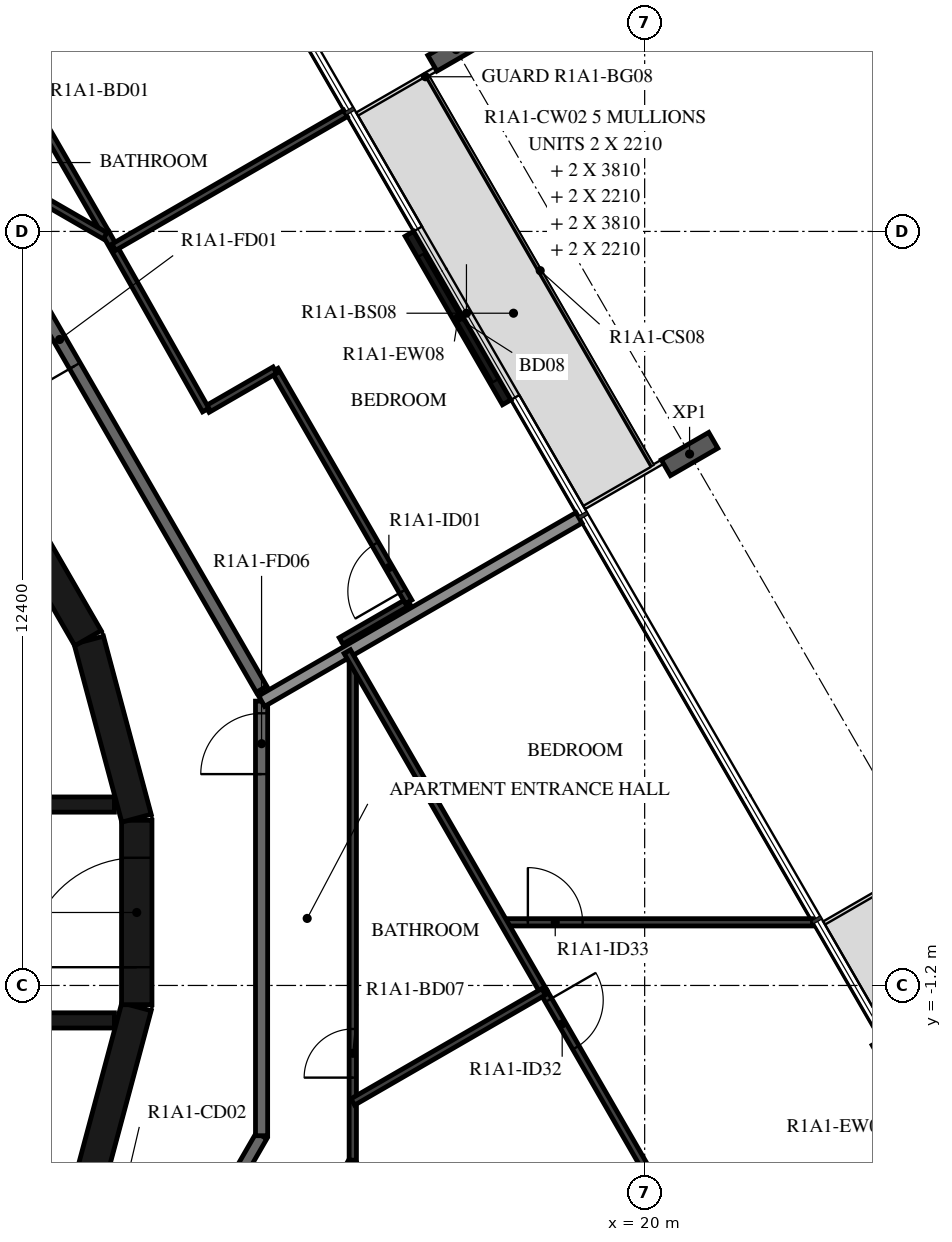
"""IFC4 building model, lengths in metres.
Left out: names, types, materials, properties, quantities, classifications, styles, units other than length and angle.
Written with IfcOpenShell. Run it as: python <this file> out.ifc"""

import sys

from ifc_helpers import new_model, si_unit, direction, frame, frame_2d, origin, origin_2d, place, context, subcontext, project, spatial, rectangle, i_section, extrude, element, fill, save


model = new_model("IFC4")
c1 = context("Model", 3, precision=1e-05, world=origin(), true_north=direction((0.0, 1.0)))
c2 = subcontext(c1, "Body", "Model", "MODEL_VIEW")
j1 = project(units=[si_unit("LENGTHUNIT", "METRE"), si_unit("PLANEANGLEUNIT", "RADIAN")], contexts=[c1])
p1 = place(None, origin())
s1 = spatial("IfcSite", under=j1, at=p1, CompositionType="ELEMENT")
p2 = place(p1, origin())
s2 = spatial("IfcBuilding", under=s1, at=p2, CompositionType="ELEMENT")
p3 = place(p2, frame((0.0, 0.0, 41.9)))
s3 = spatial("IfcBuildingStorey", under=s2, at=p3, CompositionType="ELEMENT", Elevation=41.9)
for number, where, z_axis, x_axis in (
    (1, (20.739, 7.539, -0.38), (0.0, 0.0, 1.0), (0.5, -0.866, 0.0)),
    (2, (16.899, 14.19, -0.38), (0.0, 0.0, 1.0), (0.5, -0.866, 0.0)),
):
    element("IfcColumn", number, at=place(p3, frame(where, z_axis=z_axis, x_axis=x_axis)), inside=s3, PredefinedType="COLUMN", context=c2, shape_type="SweptSolid", body=[
        extrude(i_section(OverallWidth=0.3, OverallDepth=0.9, WebThickness=0.019, FlangeThickness=0.035, FilletRadius=0.03, at=origin_2d()), origin(), (0.0, 0.0, 1.0), 3.5),
    ])
p4 = place(p3, frame((25.411, -4.913, 0.0), z_axis=(0.0, 0.0, 1.0), x_axis=(-0.500028443584, 0.866008981251, 0.0)))
e3 = element("IfcWall", 3, at=p4, inside=s3, PredefinedType="STANDARD", context=c2, shape_type="SweptSolid", body=[
    extrude(rectangle(XDim=3.2, YDim=0.16, at=frame_2d((1.6, 0.0))), origin(), (0.0, 0.0, 1.0), 3.12),
])
p5 = place(p4, frame((0.4, 0.0, 0.0)))
e4 = element("IfcOpeningElement", 4, at=p5, cuts=e3, PredefinedType="OPENING", context=c2, shape_type="SweptSolid", body=[
    extrude(rectangle(XDim=2.4, YDim=2.4, at=frame_2d((1.2, 1.2))), frame((0.0, 0.09, 0.0), z_axis=(0.0, -1.0, 0.0), x_axis=(1.0, 0.0, 0.0)), (0.0, 0.0, 1.0), 0.18),
])
p6 = place(p3, frame((17.731, 8.389, 0.0), z_axis=(0.0, 0.0, 1.0), x_axis=(-0.500028443584, 0.866008981251, 0.0)))
e5 = element("IfcWall", 5, at=p6, inside=s3, PredefinedType="STANDARD", context=c2, shape_type="SweptSolid", body=[
    extrude(rectangle(XDim=3.2, YDim=0.16, at=frame_2d((1.6, 0.0))), origin(), (0.0, 0.0, 1.0), 3.12),
])
p7 = place(p6, frame((0.4, 0.0, 0.0)))
e6 = element("IfcOpeningElement", 6, at=p7, cuts=e5, PredefinedType="OPENING", context=c2, shape_type="SweptSolid", body=[
    extrude(rectangle(XDim=2.4, YDim=2.4, at=frame_2d((1.2, 1.2))), frame((0.0, 0.09, 0.0), z_axis=(0.0, -1.0, 0.0), x_axis=(1.0, 0.0, 0.0)), (0.0, 0.0, 1.0), 0.18),
])
p8 = place(p3, frame((10.858, -4.479, 0.0), z_axis=(0.0, 0.0, 1.0), x_axis=(0.258734743916, 0.965948410781, 0.0)))
e7 = element("IfcWall", 7, at=p8, inside=s3, PredefinedType="SHEAR", context=c2, shape_type="SweptSolid", body=[
    extrude(rectangle(XDim=3.033, YDim=0.5, at=frame_2d((1.516, 0.0))), origin(), (0.0, 0.0, 1.0), 3.12),
])
p9 = place(p3, frame((11.647, -1.516, 0.0), z_axis=(0.0, 0.0, 1.0), x_axis=(0.0, 1.0, 0.0)))
e8 = element("IfcWall", 8, at=p9, inside=s3, PredefinedType="SHEAR", context=c2, shape_type="SweptSolid", body=[
    extrude(rectangle(XDim=3.033, YDim=0.5, at=frame_2d((1.516, 0.0))), origin(), (0.0, 0.0, 1.0), 3.12),
])
p10 = place(p9, frame((0.616, 0.0, 0.0)))
e9 = element("IfcOpeningElement", 9, at=p10, cuts=e8, PredefinedType="OPENING", context=c2, shape_type="SweptSolid", body=[
    extrude(rectangle(XDim=1.8, YDim=2.1, at=frame_2d((0.9, 1.05))), frame((0.0, 0.26, 0.0), z_axis=(0.0, -1.0, 0.0), x_axis=(1.0, 0.0, 0.0)), (0.0, 0.0, 1.0), 0.52),
])
for number, where, z_axis, x_axis in (
    (10, (11.643, 1.55, 0.0), (0.0, 0.0, 1.0), (-0.259, 0.966, 0.0)),
    (11, (10.845, 4.51, 0.0), (0.0, 0.0, 1.0), (-0.5, 0.866, 0.0)),
):
    element("IfcWall", number, at=place(p3, frame(where, z_axis=z_axis, x_axis=x_axis)), inside=s3, PredefinedType="SHEAR", context=c2, shape_type="SweptSolid", body=[
        extrude(rectangle(XDim=3.033, YDim=0.5, at=frame_2d((1.516, 0.0))), origin(), (0.0, 0.0, 1.0), 3.12),
    ])
p11 = place(p3, frame((3.35, 1.775, 0.0), z_axis=(0.0, 0.0, 1.0), x_axis=(1.0, 0.0, 0.0)))
e12 = element("IfcWall", 12, at=p11, inside=s3, PredefinedType="SHEAR", context=c2, shape_type="SweptSolid", body=[
    extrude(rectangle(XDim=7.93, YDim=0.25, at=frame_2d((3.965, 0.0))), origin(), (0.0, 0.0, 1.0), 3.12),
])
p12 = place(p11, frame((0.35, 0.0, 0.0)))
e13 = element("IfcOpeningElement", 13, at=p12, cuts=e12, PredefinedType="OPENING", context=c2, shape_type="SweptSolid", body=[
    extrude(rectangle(XDim=1.2, YDim=2.4, at=frame_2d((0.6, 1.2))), frame((0.0, 0.135, 0.0), z_axis=(0.0, -1.0, 0.0), x_axis=(1.0, 0.0, 0.0)), (0.0, 0.0, 1.0), 0.27),
])
p13 = place(p11, frame((2.5, 0.0, 0.0)))
e14 = element("IfcOpeningElement", 14, at=p13, cuts=e12, PredefinedType="OPENING", context=c2, shape_type="SweptSolid", body=[
    extrude(rectangle(XDim=1.2, YDim=2.4, at=frame_2d((0.6, 1.2))), frame((0.0, 0.135, 0.0), z_axis=(0.0, -1.0, 0.0), x_axis=(1.0, 0.0, 0.0)), (0.0, 0.0, 1.0), 0.27),
])
p14 = place(p11, frame((4.8, 0.0, 0.0)))
e15 = element("IfcOpeningElement", 15, at=p14, cuts=e12, PredefinedType="OPENING", context=c2, shape_type="SweptSolid", body=[
    extrude(rectangle(XDim=0.9, YDim=2.1, at=frame_2d((0.45, 1.05))), frame((0.0, 0.135, 0.0), z_axis=(0.0, -1.0, 0.0), x_axis=(1.0, 0.0, 0.0)), (0.0, 0.0, 1.0), 0.27),
])
p15 = place(p3, frame((3.35, -1.775, 0.0), z_axis=(0.0, 0.0, 1.0), x_axis=(1.0, 0.0, 0.0)))
e16 = element("IfcWall", 16, at=p15, inside=s3, PredefinedType="SHEAR", context=c2, shape_type="SweptSolid", body=[
    extrude(rectangle(XDim=7.93, YDim=0.25, at=frame_2d((3.965, 0.0))), origin(), (0.0, 0.0, 1.0), 3.12),
])
p16 = place(p15, frame((0.4, 0.0, 0.0)))
e17 = element("IfcOpeningElement", 17, at=p16, cuts=e16, PredefinedType="OPENING", context=c2, shape_type="SweptSolid", body=[
    extrude(rectangle(XDim=1.1, YDim=2.4, at=frame_2d((0.55, 1.2))), frame((0.0, 0.135, 0.0), z_axis=(0.0, -1.0, 0.0), x_axis=(1.0, 0.0, 0.0)), (0.0, 0.0, 1.0), 0.27),
])
p17 = place(p15, frame((2.55, 0.0, 0.0)))
e18 = element("IfcOpeningElement", 18, at=p17, cuts=e16, PredefinedType="OPENING", context=c2, shape_type="SweptSolid", body=[
    extrude(rectangle(XDim=1.1, YDim=2.4, at=frame_2d((0.55, 1.2))), frame((0.0, 0.135, 0.0), z_axis=(0.0, -1.0, 0.0), x_axis=(1.0, 0.0, 0.0)), (0.0, 0.0, 1.0), 0.27),
])
p18 = place(p15, frame((4.7, 0.0, 0.0)))
e19 = element("IfcOpeningElement", 19, at=p18, cuts=e16, PredefinedType="OPENING", context=c2, shape_type="SweptSolid", body=[
    extrude(rectangle(XDim=1.1, YDim=2.4, at=frame_2d((0.55, 1.2))), frame((0.0, 0.135, 0.0), z_axis=(0.0, -1.0, 0.0), x_axis=(1.0, 0.0, 0.0)), (0.0, 0.0, 1.0), 0.27),
])
p19 = place(p3, frame((13.7, 3.671, 0.0), z_axis=(0.0, 0.0, 1.0), x_axis=(-0.500001669485, 0.866024439905, 0.0)))
e20 = element("IfcWall", 20, at=p19, inside=s3, PredefinedType="STANDARD", context=c2, shape_type="SweptSolid", body=[
    extrude(rectangle(XDim=7.342, YDim=0.2, at=frame_2d((3.671, 0.0))), origin(), (0.0, 0.0, 1.0), 3.12),
])
p20 = place(p19, frame((6.142, 0.0, 0.0)))
e21 = element("IfcOpeningElement", 21, at=p20, cuts=e20, PredefinedType="OPENING", context=c2, shape_type="SweptSolid", body=[
    extrude(rectangle(XDim=1.0, YDim=2.1, at=frame_2d((0.5, 1.05))), frame((0.0, 0.11, 0.0), z_axis=(0.0, -1.0, 0.0), x_axis=(1.0, 0.0, 0.0)), (0.0, 0.0, 1.0), 0.22),
])
p21 = place(p3, frame((11.865, -6.849, 0.0), z_axis=(0.0, 0.0, 1.0), x_axis=(0.500002704028, 0.866023842607, 0.0)))
e22 = element("IfcWall", 22, at=p21, inside=s3, PredefinedType="STANDARD", context=c2, shape_type="SweptSolid", body=[
    extrude(rectangle(XDim=3.67, YDim=0.2, at=frame_2d((1.835, 0.0))), origin(), (0.0, 0.0, 1.0), 3.12),
])
p22 = place(p3, frame((13.7, -3.671, 0.0), z_axis=(0.0, 0.0, 1.0), x_axis=(0.0, 1.0, 0.0)))
e23 = element("IfcWall", 23, at=p22, inside=s3, PredefinedType="STANDARD", context=c2, shape_type="SweptSolid", body=[
    extrude(rectangle(XDim=7.146, YDim=0.2, at=frame_2d((3.573, 0.0))), origin(), (0.0, 0.0, 1.0), 3.12),
])
p23 = place(p22, frame((5.947, 0.0, 0.0)))
e24 = element("IfcOpeningElement", 24, at=p23, cuts=e23, PredefinedType="OPENING", context=c2, shape_type="SweptSolid", body=[
    extrude(rectangle(XDim=1.0, YDim=2.1, at=frame_2d((0.5, 1.05))), frame((0.0, 0.11, 0.0), z_axis=(0.0, -1.0, 0.0), x_axis=(1.0, 0.0, 0.0)), (0.0, 0.0, 1.0), 0.22),
])
p24 = place(p3, frame((13.7, 3.476, 0.0), z_axis=(0.0, 0.0, 1.0), x_axis=(0.866013584312, 0.500020471368, 0.0)))
e25 = element("IfcWall", 25, at=p24, inside=s3, PredefinedType="STANDARD", context=c2, shape_type="SweptSolid", body=[
    extrude(rectangle(XDim=6.028, YDim=0.2, at=frame_2d((3.014, 0.0))), origin(), (0.0, 0.0, 1.0), 2.73),
])
p25 = place(p3, frame((15.007, 4.467, 0.0), z_axis=(0.0, 0.0, 1.0), x_axis=(0.86599869919, 0.500046250861, 0.0)))
e26 = element("IfcWall", 26, at=p25, inside=s3, PredefinedType="PARTITIONING", context=c2, shape_type="SweptSolid", body=[
    extrude(rectangle(XDim=1.284, YDim=0.12, at=frame_2d((0.642, 0.0))), origin(), (0.0, 0.0, 1.0), 3.12),
])
p26 = place(p3, frame((16.119, 5.109, 0.0), z_axis=(0.0, 0.0, 1.0), x_axis=(-0.499988222896, 0.866032203192, 0.0)))
e27 = element("IfcWall", 27, at=p26, inside=s3, PredefinedType="PARTITIONING", context=c2, shape_type="SweptSolid", body=[
    extrude(rectangle(XDim=4.4, YDim=0.12, at=frame_2d((2.2, 0.0))), origin(), (0.0, 0.0, 1.0), 3.12),
])
p27 = place(p26, frame((0.2, 0.0, 0.0)))
e28 = element("IfcOpeningElement", 28, at=p27, cuts=e27, PredefinedType="OPENING", context=c2, shape_type="SweptSolid", body=[
    extrude(rectangle(XDim=0.9, YDim=2.1, at=frame_2d((0.45, 1.05))), frame((0.0, 0.07, 0.0), z_axis=(0.0, -1.0, 0.0), x_axis=(1.0, 0.0, 0.0)), (0.0, 0.0, 1.0), 0.14),
])
p28 = place(p3, frame((13.919, 8.919, 0.0), z_axis=(0.0, 0.0, 1.0), x_axis=(-0.86599869919, -0.500046250861, 0.0)))
e29 = element("IfcWall", 29, at=p28, inside=s3, PredefinedType="PARTITIONING", context=c2, shape_type="SweptSolid", body=[
    extrude(rectangle(XDim=1.284, YDim=0.12, at=frame_2d((0.642, 0.0))), origin(), (0.0, 0.0, 1.0), 3.12),
])
p29 = place(p3, frame((12.781, 8.262, 0.0), z_axis=(0.0, 0.0, 1.0), x_axis=(-0.492233259633, 0.870463335305, 0.0)))
e30 = element("IfcWall", 30, at=p29, inside=s3, PredefinedType="PARTITIONING", context=c2, shape_type="SweptSolid", body=[
    extrude(rectangle(XDim=3.336, YDim=0.12, at=frame_2d((1.668, 0.0))), origin(), (0.0, 0.0, 1.0), 3.12),
])
p30 = place(p3, frame((11.139, 11.167, 0.0), z_axis=(0.0, 0.0, 1.0), x_axis=(-0.499994660107, 0.866028486751, 0.0)))
e31 = element("IfcWall", 31, at=p30, inside=s3, PredefinedType="PARTITIONING", context=c2, shape_type="SweptSolid", body=[
    extrude(rectangle(XDim=15.786, YDim=0.12, at=frame_2d((7.893, 0.0))), origin(), (0.0, 0.0, 1.0), 3.12),
])
p31 = place(p30, frame((5.279, 0.0, 0.0)))
e32 = element("IfcOpeningElement", 32, at=p31, cuts=e31, PredefinedType="OPENING", context=c2, shape_type="SweptSolid", body=[
    extrude(rectangle(XDim=0.9, YDim=2.1, at=frame_2d((0.45, 1.05))), frame((0.0, 0.07, 0.0), z_axis=(0.0, -1.0, 0.0), x_axis=(1.0, 0.0, 0.0)), (0.0, 0.0, 1.0), 0.14),
])
p32 = place(p30, frame((12.23, 0.0, 0.0)))
e33 = element("IfcOpeningElement", 33, at=p32, cuts=e31, PredefinedType="OPENING", context=c2, shape_type="SweptSolid", body=[
    extrude(rectangle(XDim=0.9, YDim=2.1, at=frame_2d((0.45, 1.05))), frame((0.0, 0.07, 0.0), z_axis=(0.0, -1.0, 0.0), x_axis=(1.0, 0.0, 0.0)), (0.0, 0.0, 1.0), 0.14),
])
p33 = place(p3, frame((11.127, 11.127, 0.0), z_axis=(0.0, 0.0, 1.0), x_axis=(-0.866043916853, 0.499967933054, 0.0)))
e34 = element("IfcWall", 34, at=p33, inside=s3, PredefinedType="PARTITIONING", context=c2, shape_type="SweptSolid", body=[
    extrude(rectangle(XDim=4.821, YDim=0.12, at=frame_2d((2.411, 0.0))), origin(), (0.0, 0.0, 1.0), 3.12),
])
p34 = place(p33, frame((1.4, 0.0, 0.0)))
e35 = element("IfcOpeningElement", 35, at=p34, cuts=e34, PredefinedType="OPENING", context=c2, shape_type="SweptSolid", body=[
    extrude(rectangle(XDim=0.8, YDim=2.1, at=frame_2d((0.4, 1.05))), frame((0.0, 0.07, 0.0), z_axis=(0.0, -1.0, 0.0), x_axis=(1.0, 0.0, 0.0)), (0.0, 0.0, 1.0), 0.14),
])
p35 = place(p3, frame((15.08, 13.14, 0.0), z_axis=(0.0, 0.0, 1.0), x_axis=(-0.866032203192, -0.499988222896, 0.0)))
e36 = element("IfcWall", 36, at=p35, inside=s3, PredefinedType="PARTITIONING", context=c2, shape_type="SweptSolid", body=[
    extrude(rectangle(XDim=4.4, YDim=0.12, at=frame_2d((2.2, 0.0))), origin(), (0.0, 0.0, 1.0), 2.73),
])
p36 = place(p3, frame((14.363, -5.523, 0.0), z_axis=(0.0, 0.0, 1.0), x_axis=(0.499995851058, 0.866027799164, 0.0)))
e37 = element("IfcWall", 37, at=p36, inside=s3, PredefinedType="PARTITIONING", context=c2, shape_type="SweptSolid", body=[
    extrude(rectangle(XDim=1.675, YDim=0.12, at=frame_2d((0.837, 0.0))), origin(), (0.0, 0.0, 1.0), 3.12),
])
p37 = place(p3, frame((15.2, -4.073, 0.0), z_axis=(0.0, 0.0, 1.0), x_axis=(0.0, 1.0, 0.0)))
e38 = element("IfcWall", 38, at=p37, inside=s3, PredefinedType="PARTITIONING", context=c2, shape_type="SweptSolid", body=[
    extrude(rectangle(XDim=8.146, YDim=0.12, at=frame_2d((4.073, 0.0))), origin(), (0.0, 0.0, 1.0), 3.12),
])
p38 = place(p37, frame((1.357, 0.0, 0.0)))
e39 = element("IfcOpeningElement", 39, at=p38, cuts=e38, PredefinedType="OPENING", context=c2, shape_type="SweptSolid", body=[
    extrude(rectangle(XDim=0.8, YDim=2.1, at=frame_2d((0.4, 1.05))), frame((0.0, 0.07, 0.0), z_axis=(0.0, -1.0, 0.0), x_axis=(1.0, 0.0, 0.0)), (0.0, 0.0, 1.0), 0.14),
])
p39 = place(p3, frame((17.679, -0.162, 0.0), z_axis=(0.0, 0.0, 1.0), x_axis=(1.0, 0.0, 0.0)))
e40 = element("IfcWall", 40, at=p39, inside=s3, PredefinedType="PARTITIONING", context=c2, shape_type="SweptSolid", body=[
    extrude(rectangle(XDim=5.081, YDim=0.12, at=frame_2d((2.54, 0.0))), origin(), (0.0, 0.0, 1.0), 3.12),
])
p40 = place(p39, frame((0.4, 0.0, 0.0)))
e41 = element("IfcOpeningElement", 41, at=p40, cuts=e40, PredefinedType="OPENING", context=c2, shape_type="SweptSolid", body=[
    extrude(rectangle(XDim=0.9, YDim=2.1, at=frame_2d((0.45, 1.05))), frame((0.0, 0.07, 0.0), z_axis=(0.0, -1.0, 0.0), x_axis=(1.0, 0.0, 0.0)), (0.0, 0.0, 1.0), 0.14),
])
p41 = place(p3, frame((15.11, 4.289, 0.0), z_axis=(0.0, 0.0, 1.0), x_axis=(0.500001702147, -0.866024421047, 0.0)))
e42 = element("IfcWall", 42, at=p41, inside=s3, PredefinedType="PARTITIONING", context=c2, shape_type="SweptSolid", body=[
    extrude(rectangle(XDim=6.458, YDim=0.12, at=frame_2d((3.229, 0.0))), origin(), (0.0, 0.0, 1.0), 3.12),
])
p42 = place(p3, frame((18.339, -1.303, 0.0), z_axis=(0.0, 0.0, 1.0), x_axis=(0.499989127021, -0.866031681211, 0.0)))
e43 = element("IfcWall", 43, at=p42, inside=s3, PredefinedType="PARTITIONING", context=c2, shape_type="SweptSolid", body=[
    extrude(rectangle(XDim=9.589, YDim=0.12, at=frame_2d((4.794, 0.0))), origin(), (0.0, 0.0, 1.0), 3.12),
])
p43 = place(p42, frame((0.16, 0.0, 0.0)))
e44 = element("IfcOpeningElement", 44, at=p43, cuts=e43, PredefinedType="OPENING", context=c2, shape_type="SweptSolid", body=[
    extrude(rectangle(XDim=0.9, YDim=2.1, at=frame_2d((0.45, 1.05))), frame((0.0, 0.07, 0.0), z_axis=(0.0, -1.0, 0.0), x_axis=(1.0, 0.0, 0.0)), (0.0, 0.0, 1.0), 0.14),
])
p44 = place(p42, frame((6.618, 0.0, 0.0)))
e45 = element("IfcOpeningElement", 45, at=p44, cuts=e43, PredefinedType="OPENING", context=c2, shape_type="SweptSolid", body=[
    extrude(rectangle(XDim=0.9, YDim=2.1, at=frame_2d((0.45, 1.05))), frame((0.0, 0.07, 0.0), z_axis=(0.0, -1.0, 0.0), x_axis=(1.0, 0.0, 0.0)), (0.0, 0.0, 1.0), 0.14),
])
p45 = place(p3, frame((18.339, -1.303, 0.0), z_axis=(0.0, 0.0, 1.0), x_axis=(-0.866037510713, -0.499979029598, 0.0)))
e46 = element("IfcWall", 46, at=p45, inside=s3, PredefinedType="PARTITIONING", context=c2, shape_type="SweptSolid", body=[
    extrude(rectangle(XDim=3.624, YDim=0.12, at=frame_2d((1.812, 0.0))), origin(), (0.0, 0.0, 1.0), 3.12),
])
p46 = place(p7, origin())
e47 = element("IfcDoor", 47, at=p46, inside=s3, OperationType="DOUBLE_DOOR_SLIDING", PredefinedType="DOOR", context=c2, shape_type="SweptSolid", body=[
    extrude(rectangle(XDim=2.4, YDim=2.4, at=frame_2d((1.2, 1.2))), frame((0.0, 0.025, 0.0), z_axis=(0.0, -1.0, 0.0), x_axis=(1.0, 0.0, 0.0)), (0.0, 0.0, 1.0), 0.05),
])
fill(e6, e47)
p47 = place(p10, origin())
e48 = element("IfcDoor", 48, at=p47, inside=s3, OperationType="DOUBLE_DOOR_SINGLE_SWING", PredefinedType="DOOR", context=c2, shape_type="SweptSolid", body=[
    extrude(rectangle(XDim=1.8, YDim=2.1, at=frame_2d((0.9, 1.05))), frame((0.0, 0.025, 0.0), z_axis=(0.0, -1.0, 0.0), x_axis=(1.0, 0.0, 0.0)), (0.0, 0.0, 1.0), 0.05),
])
fill(e9, e48)
p48 = place(p20, origin())
e49 = element("IfcDoor", 49, at=p48, inside=s3, OperationType="SINGLE_SWING_RIGHT", PredefinedType="DOOR", context=c2, shape_type="SweptSolid", body=[
    extrude(rectangle(XDim=1.0, YDim=2.1, at=frame_2d((0.5, 1.05))), frame((0.0, 0.025, 0.0), z_axis=(0.0, -1.0, 0.0), x_axis=(1.0, 0.0, 0.0)), (0.0, 0.0, 1.0), 0.05),
])
fill(e21, e49)
p49 = place(p27, origin())
e50 = element("IfcDoor", 50, at=p49, inside=s3, OperationType="SINGLE_SWING_LEFT", PredefinedType="DOOR", context=c2, shape_type="SweptSolid", body=[
    extrude(rectangle(XDim=0.9, YDim=2.1, at=frame_2d((0.45, 1.05))), frame((0.0, 0.025, 0.0), z_axis=(0.0, -1.0, 0.0), x_axis=(1.0, 0.0, 0.0)), (0.0, 0.0, 1.0), 0.05),
])
fill(e28, e50)
p50 = place(p23, origin())
e51 = element("IfcDoor", 51, at=p50, inside=s3, OperationType="SINGLE_SWING_LEFT", PredefinedType="DOOR", context=c2, shape_type="SweptSolid", body=[
    extrude(rectangle(XDim=1.0, YDim=2.1, at=frame_2d((0.5, 1.05))), frame((0.0, 0.025, 0.0), z_axis=(0.0, -1.0, 0.0), x_axis=(1.0, 0.0, 0.0)), (0.0, 0.0, 1.0), 0.05),
])
fill(e24, e51)
p51 = place(p38, origin())
e52 = element("IfcDoor", 52, at=p51, inside=s3, OperationType="SINGLE_SWING_LEFT", PredefinedType="DOOR", context=c2, shape_type="SweptSolid", body=[
    extrude(rectangle(XDim=0.8, YDim=2.1, at=frame_2d((0.4, 1.05))), frame((0.0, 0.025, 0.0), z_axis=(0.0, -1.0, 0.0), x_axis=(1.0, 0.0, 0.0)), (0.0, 0.0, 1.0), 0.05),
])
fill(e39, e52)
p52 = place(p43, origin())
e53 = element("IfcDoor", 53, at=p52, inside=s3, OperationType="SINGLE_SWING_LEFT", PredefinedType="DOOR", context=c2, shape_type="SweptSolid", body=[
    extrude(rectangle(XDim=0.9, YDim=2.1, at=frame_2d((0.45, 1.05))), frame((0.0, 0.025, 0.0), z_axis=(0.0, -1.0, 0.0), x_axis=(1.0, 0.0, 0.0)), (0.0, 0.0, 1.0), 0.05),
])
fill(e44, e53)
p53 = place(p40, origin())
e54 = element("IfcDoor", 54, at=p53, inside=s3, OperationType="SINGLE_SWING_LEFT", PredefinedType="DOOR", context=c2, shape_type="SweptSolid", body=[
    extrude(rectangle(XDim=0.9, YDim=2.1, at=frame_2d((0.45, 1.05))), frame((0.0, 0.025, 0.0), z_axis=(0.0, -1.0, 0.0), x_axis=(1.0, 0.0, 0.0)), (0.0, 0.0, 1.0), 0.05),
])
fill(e41, e54)
save(model, sys.argv[1])
